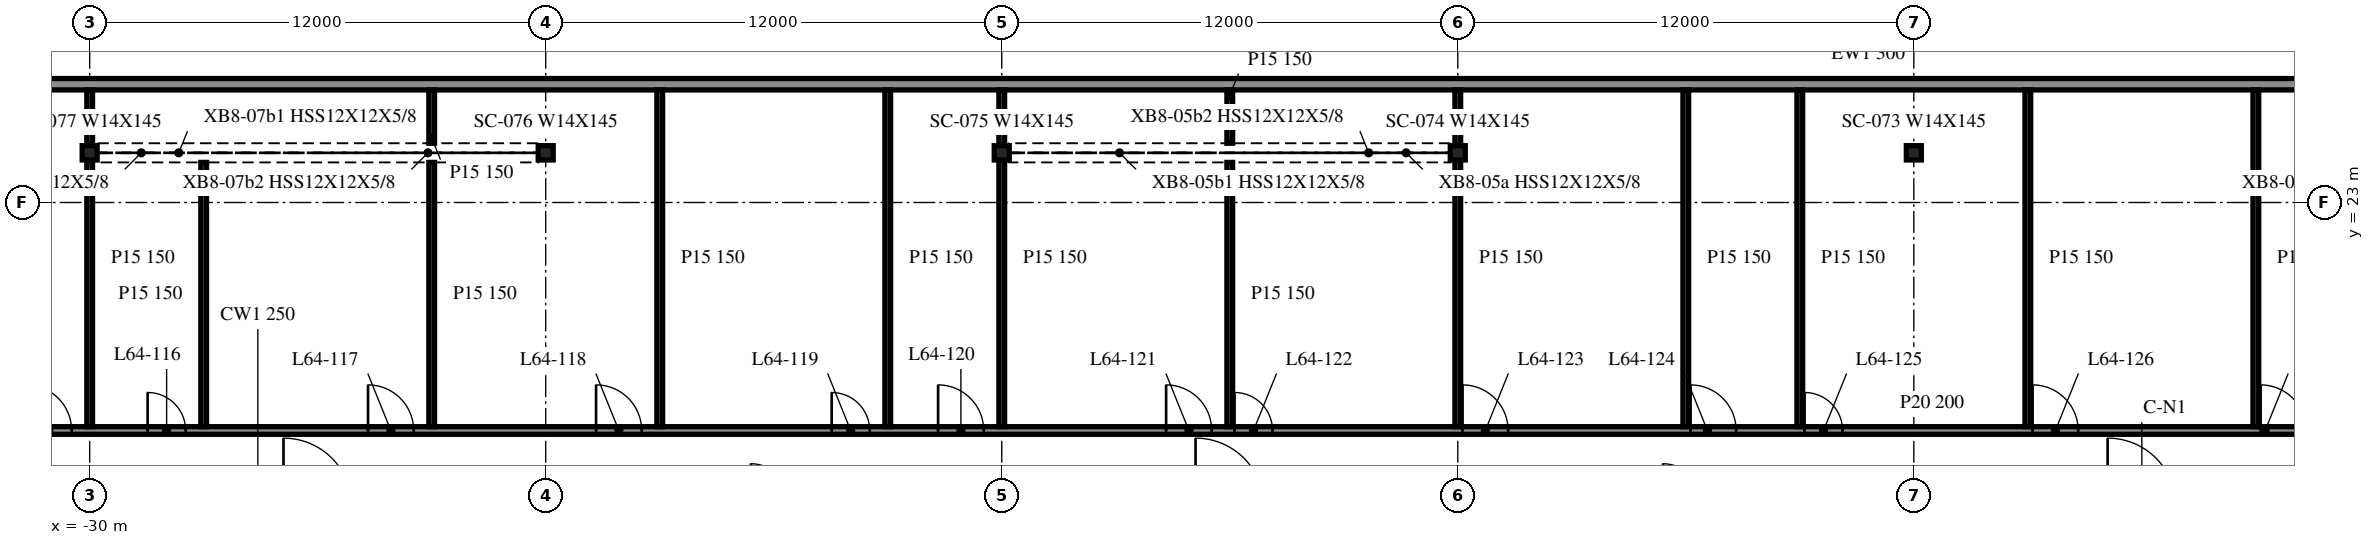
"""IFC4 building model, lengths in metres.
Left out: names, types, materials, properties, quantities, classifications, styles, units other than length and angle.
Written with IfcOpenShell. Run it as: python <this file> out.ifc"""

import sys

from ifc_helpers import new_model, si_unit, direction, frame, frame_2d, origin, origin_2d, place, context, subcontext, project, spatial, rectangle, i_section, extrude, element, fill, save


model = new_model("IFC4")
c1 = context("Model", 3, precision=1e-05, world=origin(), true_north=direction((0.0, 1.0)))
c2 = subcontext(c1, "Body", "Model", "MODEL_VIEW")
j1 = project(units=[si_unit("LENGTHUNIT", "METRE"), si_unit("PLANEANGLEUNIT", "RADIAN")], contexts=[c1])
p1 = place(None, origin())
s1 = spatial("IfcSite", under=j1, at=p1, CompositionType="ELEMENT")
p2 = place(p1, origin())
s2 = spatial("IfcBuilding", under=s1, at=p2, CompositionType="ELEMENT")
p3 = place(p2, frame((0.0, 0.0, 263.3)))
s3 = spatial("IfcBuildingStorey", under=s2, at=p3, CompositionType="ELEMENT", Elevation=263.3)
for number, where, z_axis, x_axis in (
    (1, (18.0, 24.307, -0.34), (0.0, 0.0, 1.0), (1.0, 0.0, 0.0)),
    (2, (6.0, 24.307, -0.34), (0.0, 0.0, 1.0), (1.0, 0.0, 0.0)),
    (3, (-6.0, 24.307, -0.34), (0.0, 0.0, 1.0), (1.0, 0.0, 0.0)),
    (4, (-18.0, 24.307, -0.34), (0.0, 0.0, 1.0), (1.0, 0.0, 0.0)),
    (5, (-30.0, 24.307, -0.34), (0.0, 0.0, 1.0), (1.0, 0.0, 0.0)),
):
    element("IfcColumn", number, at=place(p3, frame(where, z_axis=z_axis, x_axis=x_axis)), inside=s3, PredefinedType="COLUMN", context=c2, shape_type="SweptSolid", body=[
        extrude(i_section(OverallWidth=0.394, OverallDepth=0.376, WebThickness=0.017, FlangeThickness=0.028, at=origin_2d()), origin(), (0.0, 0.0, 1.0), 3.8),
    ])
p4 = place(p3, frame((42.0, 26.112, 0.0), z_axis=(0.0, 0.0, 1.0), x_axis=(-1.0, 0.0, 0.0)))
e6 = element("IfcWall", 6, at=p4, inside=s3, PredefinedType="NOTDEFINED", context=c2, shape_type="SweptSolid", body=[
    extrude(rectangle(XDim=84.0, YDim=0.3, at=frame_2d((42.0, 0.0))), origin(), (0.0, 0.0, 1.0), 2.853),
])
p5 = place(p3, frame((-47.975, 17.0, 0.0), z_axis=(0.0, 0.0, 1.0), x_axis=(1.0, 0.0, 0.0)))
e7 = element("IfcWall", 7, at=p5, inside=s3, PredefinedType="PARTITIONING", context=c2, shape_type="SweptSolid", body=[
    extrude(rectangle(XDim=95.95, YDim=0.2, at=frame_2d((47.975, 0.0))), origin(), (0.0, 0.0, 1.0), 3.46),
])
p6 = place(p5, frame((4.5, 0.0, 0.0)))
e8 = element("IfcOpeningElement", 8, at=p6, cuts=e7, PredefinedType="OPENING", context=c2, shape_type="SweptSolid", body=[
    extrude(rectangle(XDim=1.0, YDim=2.1, at=frame_2d((0.5, 1.05))), frame((0.0, 0.11, 0.0), z_axis=(0.0, -1.0, 0.0), x_axis=(1.0, 0.0, 0.0)), (0.0, 0.0, 1.0), 0.22),
])
p7 = place(p5, frame((10.3, 0.0, 0.0)))
e9 = element("IfcOpeningElement", 9, at=p7, cuts=e7, PredefinedType="OPENING", context=c2, shape_type="SweptSolid", body=[
    extrude(rectangle(XDim=1.2, YDim=2.1, at=frame_2d((0.6, 1.05))), frame((0.0, 0.11, 0.0), z_axis=(0.0, -1.0, 0.0), x_axis=(1.0, 0.0, 0.0)), (0.0, 0.0, 1.0), 0.22),
])
p8 = place(p5, frame((16.3, 0.0, 0.0)))
e10 = element("IfcOpeningElement", 10, at=p8, cuts=e7, PredefinedType="OPENING", context=c2, shape_type="SweptSolid", body=[
    extrude(rectangle(XDim=1.2, YDim=2.1, at=frame_2d((0.6, 1.05))), frame((0.0, 0.11, 0.0), z_axis=(0.0, -1.0, 0.0), x_axis=(1.0, 0.0, 0.0)), (0.0, 0.0, 1.0), 0.22),
])
p9 = place(p5, frame((19.5, 0.0, 0.0)))
e11 = element("IfcOpeningElement", 11, at=p9, cuts=e7, PredefinedType="OPENING", context=c2, shape_type="SweptSolid", body=[
    extrude(rectangle(XDim=1.0, YDim=2.1, at=frame_2d((0.5, 1.05))), frame((0.0, 0.11, 0.0), z_axis=(0.0, -1.0, 0.0), x_axis=(1.0, 0.0, 0.0)), (0.0, 0.0, 1.0), 0.22),
])
p10 = place(p5, frame((25.3, 0.0, 0.0)))
e12 = element("IfcOpeningElement", 12, at=p10, cuts=e7, PredefinedType="OPENING", context=c2, shape_type="SweptSolid", body=[
    extrude(rectangle(XDim=1.2, YDim=2.1, at=frame_2d((0.6, 1.05))), frame((0.0, 0.11, 0.0), z_axis=(0.0, -1.0, 0.0), x_axis=(1.0, 0.0, 0.0)), (0.0, 0.0, 1.0), 0.22),
])
p11 = place(p5, frame((31.3, 0.0, 0.0)))
e13 = element("IfcOpeningElement", 13, at=p11, cuts=e7, PredefinedType="OPENING", context=c2, shape_type="SweptSolid", body=[
    extrude(rectangle(XDim=1.2, YDim=2.1, at=frame_2d((0.6, 1.05))), frame((0.0, 0.11, 0.0), z_axis=(0.0, -1.0, 0.0), x_axis=(1.0, 0.0, 0.0)), (0.0, 0.0, 1.0), 0.22),
])
p12 = place(p5, frame((37.5, 0.0, 0.0)))
e14 = element("IfcOpeningElement", 14, at=p12, cuts=e7, PredefinedType="OPENING", context=c2, shape_type="SweptSolid", body=[
    extrude(rectangle(XDim=1.0, YDim=2.1, at=frame_2d((0.5, 1.05))), frame((0.0, 0.11, 0.0), z_axis=(0.0, -1.0, 0.0), x_axis=(1.0, 0.0, 0.0)), (0.0, 0.0, 1.0), 0.22),
])
p13 = place(p5, frame((40.3, 0.0, 0.0)))
e15 = element("IfcOpeningElement", 15, at=p13, cuts=e7, PredefinedType="OPENING", context=c2, shape_type="SweptSolid", body=[
    extrude(rectangle(XDim=1.2, YDim=2.1, at=frame_2d((0.6, 1.05))), frame((0.0, 0.11, 0.0), z_axis=(0.0, -1.0, 0.0), x_axis=(1.0, 0.0, 0.0)), (0.0, 0.0, 1.0), 0.22),
])
p14 = place(p5, frame((46.3, 0.0, 0.0)))
e16 = element("IfcOpeningElement", 16, at=p14, cuts=e7, PredefinedType="OPENING", context=c2, shape_type="SweptSolid", body=[
    extrude(rectangle(XDim=1.2, YDim=2.1, at=frame_2d((0.6, 1.05))), frame((0.0, 0.11, 0.0), z_axis=(0.0, -1.0, 0.0), x_axis=(1.0, 0.0, 0.0)), (0.0, 0.0, 1.0), 0.22),
])
p15 = place(p5, frame((48.1, 0.0, 0.0)))
e17 = element("IfcOpeningElement", 17, at=p15, cuts=e7, PredefinedType="OPENING", context=c2, shape_type="SweptSolid", body=[
    extrude(rectangle(XDim=1.0, YDim=2.1, at=frame_2d((0.5, 1.05))), frame((0.0, 0.11, 0.0), z_axis=(0.0, -1.0, 0.0), x_axis=(1.0, 0.0, 0.0)), (0.0, 0.0, 1.0), 0.22),
])
p16 = place(p5, frame((54.1, 0.0, 0.0)))
e18 = element("IfcOpeningElement", 18, at=p16, cuts=e7, PredefinedType="OPENING", context=c2, shape_type="SweptSolid", body=[
    extrude(rectangle(XDim=1.2, YDim=2.1, at=frame_2d((0.6, 1.05))), frame((0.0, 0.11, 0.0), z_axis=(0.0, -1.0, 0.0), x_axis=(1.0, 0.0, 0.0)), (0.0, 0.0, 1.0), 0.22),
])
p17 = place(p5, frame((60.1, 0.0, 0.0)))
e19 = element("IfcOpeningElement", 19, at=p17, cuts=e7, PredefinedType="OPENING", context=c2, shape_type="SweptSolid", body=[
    extrude(rectangle(XDim=1.2, YDim=2.1, at=frame_2d((0.6, 1.05))), frame((0.0, 0.11, 0.0), z_axis=(0.0, -1.0, 0.0), x_axis=(1.0, 0.0, 0.0)), (0.0, 0.0, 1.0), 0.22),
])
p18 = place(p5, frame((63.1, 0.0, 0.0)))
e20 = element("IfcOpeningElement", 20, at=p18, cuts=e7, PredefinedType="OPENING", context=c2, shape_type="SweptSolid", body=[
    extrude(rectangle(XDim=1.0, YDim=2.1, at=frame_2d((0.5, 1.05))), frame((0.0, 0.11, 0.0), z_axis=(0.0, -1.0, 0.0), x_axis=(1.0, 0.0, 0.0)), (0.0, 0.0, 1.0), 0.22),
])
p19 = place(p5, frame((69.1, 0.0, 0.0)))
e21 = element("IfcOpeningElement", 21, at=p19, cuts=e7, PredefinedType="OPENING", context=c2, shape_type="SweptSolid", body=[
    extrude(rectangle(XDim=1.2, YDim=2.1, at=frame_2d((0.6, 1.05))), frame((0.0, 0.11, 0.0), z_axis=(0.0, -1.0, 0.0), x_axis=(1.0, 0.0, 0.0)), (0.0, 0.0, 1.0), 0.22),
])
p20 = place(p5, frame((75.1, 0.0, 0.0)))
e22 = element("IfcOpeningElement", 22, at=p20, cuts=e7, PredefinedType="OPENING", context=c2, shape_type="SweptSolid", body=[
    extrude(rectangle(XDim=1.2, YDim=2.1, at=frame_2d((0.6, 1.05))), frame((0.0, 0.11, 0.0), z_axis=(0.0, -1.0, 0.0), x_axis=(1.0, 0.0, 0.0)), (0.0, 0.0, 1.0), 0.22),
])
p21 = place(p5, frame((81.1, 0.0, 0.0)))
e23 = element("IfcOpeningElement", 23, at=p21, cuts=e7, PredefinedType="OPENING", context=c2, shape_type="SweptSolid", body=[
    extrude(rectangle(XDim=1.0, YDim=2.1, at=frame_2d((0.5, 1.05))), frame((0.0, 0.11, 0.0), z_axis=(0.0, -1.0, 0.0), x_axis=(1.0, 0.0, 0.0)), (0.0, 0.0, 1.0), 0.22),
])
p22 = place(p5, frame((84.1, 0.0, 0.0)))
e24 = element("IfcOpeningElement", 24, at=p22, cuts=e7, PredefinedType="OPENING", context=c2, shape_type="SweptSolid", body=[
    extrude(rectangle(XDim=1.2, YDim=2.1, at=frame_2d((0.6, 1.05))), frame((0.0, 0.11, 0.0), z_axis=(0.0, -1.0, 0.0), x_axis=(1.0, 0.0, 0.0)), (0.0, 0.0, 1.0), 0.22),
])
p23 = place(p5, frame((90.1, 0.0, 0.0)))
e25 = element("IfcOpeningElement", 25, at=p23, cuts=e7, PredefinedType="OPENING", context=c2, shape_type="SweptSolid", body=[
    extrude(rectangle(XDim=1.2, YDim=2.1, at=frame_2d((0.6, 1.05))), frame((0.0, 0.11, 0.0), z_axis=(0.0, -1.0, 0.0), x_axis=(1.0, 0.0, 0.0)), (0.0, 0.0, 1.0), 0.22),
])
p24 = place(p3, frame((-30.0, 17.1, 0.0), z_axis=(0.0, 0.0, 1.0), x_axis=(0.0, 1.0, 0.0)))
e26 = element("IfcWall", 26, at=p24, inside=s3, PredefinedType="PARTITIONING", context=c2, shape_type="SweptSolid", body=[
    extrude(rectangle(XDim=8.862, YDim=0.15, at=frame_2d((4.431, 0.0))), origin(), (0.0, 0.0, 1.0), 3.46),
])
for number, where, z_axis, x_axis in (
    (27, (-27.0, 17.1, 0.0), (0.0, 0.0, 1.0), (0.0, 1.0, 0.0)),
    (28, (-21.0, 17.1, 0.0), (0.0, 0.0, 1.0), (0.0, 1.0, 0.0)),
):
    element("IfcWall", number, at=place(p3, frame(where, z_axis=z_axis, x_axis=x_axis)), inside=s3, PredefinedType="PARTITIONING", context=c2, shape_type="SweptSolid", body=[
        extrude(rectangle(XDim=6.955, YDim=0.15, at=frame_2d((3.477, 0.0))), origin(), (0.0, 0.0, 1.0), 3.46),
    ])
p25 = place(p3, frame((-21.0, 24.559, 0.0), z_axis=(0.0, 0.0, 1.0), x_axis=(0.0, 1.0, 0.0)))
e29 = element("IfcWall", 29, at=p25, inside=s3, PredefinedType="PARTITIONING", context=c2, shape_type="SweptSolid", body=[
    extrude(rectangle(XDim=1.403, YDim=0.15, at=frame_2d((0.701, 0.0))), origin(), (0.0, 0.0, 1.0), 3.46),
])
for number, where, z_axis, x_axis in (
    (30, (-15.0, 17.1, 0.0), (0.0, 0.0, 1.0), (0.0, 1.0, 0.0)),
    (31, (-9.0, 17.1, 0.0), (0.0, 0.0, 1.0), (0.0, 1.0, 0.0)),
    (32, (-6.0, 17.1, 0.0), (0.0, 0.0, 1.0), (0.0, 1.0, 0.0)),
):
    element("IfcWall", number, at=place(p3, frame(where, z_axis=z_axis, x_axis=x_axis)), inside=s3, PredefinedType="PARTITIONING", context=c2, shape_type="SweptSolid", body=[
        extrude(rectangle(XDim=8.862, YDim=0.15, at=frame_2d((4.431, 0.0))), origin(), (0.0, 0.0, 1.0), 3.46),
    ])
p26 = place(p3, frame((0.0, 17.1, 0.0), z_axis=(0.0, 0.0, 1.0), x_axis=(0.0, 1.0, 0.0)))
e33 = element("IfcWall", 33, at=p26, inside=s3, PredefinedType="PARTITIONING", context=c2, shape_type="SweptSolid", body=[
    extrude(rectangle(XDim=6.955, YDim=0.15, at=frame_2d((3.477, 0.0))), origin(), (0.0, 0.0, 1.0), 3.46),
])
p27 = place(p3, frame((0.0, 24.559, 0.0), z_axis=(0.0, 0.0, 1.0), x_axis=(0.0, 1.0, 0.0)))
e34 = element("IfcWall", 34, at=p27, inside=s3, PredefinedType="PARTITIONING", context=c2, shape_type="SweptSolid", body=[
    extrude(rectangle(XDim=1.403, YDim=0.15, at=frame_2d((0.701, 0.0))), origin(), (0.0, 0.0, 1.0), 3.46),
])
for number, where, z_axis, x_axis in (
    (35, (6.0, 17.1, 0.0), (0.0, 0.0, 1.0), (0.0, 1.0, 0.0)),
    (36, (12.0, 17.1, 0.0), (0.0, 0.0, 1.0), (0.0, 1.0, 0.0)),
    (37, (15.0, 17.1, 0.0), (0.0, 0.0, 1.0), (0.0, 1.0, 0.0)),
    (38, (21.0, 17.1, 0.0), (0.0, 0.0, 1.0), (0.0, 1.0, 0.0)),
    (39, (27.0, 17.1, 0.0), (0.0, 0.0, 1.0), (0.0, 1.0, 0.0)),
):
    element("IfcWall", number, at=place(p3, frame(where, z_axis=z_axis, x_axis=x_axis)), inside=s3, PredefinedType="PARTITIONING", context=c2, shape_type="SweptSolid", body=[
        extrude(rectangle(XDim=8.862, YDim=0.15, at=frame_2d((4.431, 0.0))), origin(), (0.0, 0.0, 1.0), 3.46),
    ])
p28 = place(p8, origin())
e40 = element("IfcDoor", 40, at=p28, inside=s3, OperationType="SINGLE_SWING_LEFT", PredefinedType="DOOR", context=c2, shape_type="SweptSolid", body=[
    extrude(rectangle(XDim=1.2, YDim=2.1, at=frame_2d((0.6, 1.05))), frame((0.0, 0.025, 0.0), z_axis=(0.0, -1.0, 0.0), x_axis=(1.0, 0.0, 0.0)), (0.0, 0.0, 1.0), 0.05),
])
fill(e10, e40)
p29 = place(p9, origin())
e41 = element("IfcDoor", 41, at=p29, inside=s3, OperationType="SINGLE_SWING_LEFT", PredefinedType="DOOR", context=c2, shape_type="SweptSolid", body=[
    extrude(rectangle(XDim=1.0, YDim=2.1, at=frame_2d((0.5, 1.05))), frame((0.0, 0.025, 0.0), z_axis=(0.0, -1.0, 0.0), x_axis=(1.0, 0.0, 0.0)), (0.0, 0.0, 1.0), 0.05),
])
fill(e11, e41)
p30 = place(p10, origin())
e42 = element("IfcDoor", 42, at=p30, inside=s3, OperationType="SINGLE_SWING_LEFT", PredefinedType="DOOR", context=c2, shape_type="SweptSolid", body=[
    extrude(rectangle(XDim=1.2, YDim=2.1, at=frame_2d((0.6, 1.05))), frame((0.0, 0.025, 0.0), z_axis=(0.0, -1.0, 0.0), x_axis=(1.0, 0.0, 0.0)), (0.0, 0.0, 1.0), 0.05),
])
fill(e12, e42)
p31 = place(p11, origin())
e43 = element("IfcDoor", 43, at=p31, inside=s3, OperationType="SINGLE_SWING_LEFT", PredefinedType="DOOR", context=c2, shape_type="SweptSolid", body=[
    extrude(rectangle(XDim=1.2, YDim=2.1, at=frame_2d((0.6, 1.05))), frame((0.0, 0.025, 0.0), z_axis=(0.0, -1.0, 0.0), x_axis=(1.0, 0.0, 0.0)), (0.0, 0.0, 1.0), 0.05),
])
fill(e13, e43)
p32 = place(p12, origin())
e44 = element("IfcDoor", 44, at=p32, inside=s3, OperationType="SINGLE_SWING_LEFT", PredefinedType="DOOR", context=c2, shape_type="SweptSolid", body=[
    extrude(rectangle(XDim=1.0, YDim=2.1, at=frame_2d((0.5, 1.05))), frame((0.0, 0.025, 0.0), z_axis=(0.0, -1.0, 0.0), x_axis=(1.0, 0.0, 0.0)), (0.0, 0.0, 1.0), 0.05),
])
fill(e14, e44)
p33 = place(p13, origin())
e45 = element("IfcDoor", 45, at=p33, inside=s3, OperationType="SINGLE_SWING_LEFT", PredefinedType="DOOR", context=c2, shape_type="SweptSolid", body=[
    extrude(rectangle(XDim=1.2, YDim=2.1, at=frame_2d((0.6, 1.05))), frame((0.0, 0.025, 0.0), z_axis=(0.0, -1.0, 0.0), x_axis=(1.0, 0.0, 0.0)), (0.0, 0.0, 1.0), 0.05),
])
fill(e15, e45)
p34 = place(p14, origin())
e46 = element("IfcDoor", 46, at=p34, inside=s3, OperationType="SINGLE_SWING_LEFT", PredefinedType="DOOR", context=c2, shape_type="SweptSolid", body=[
    extrude(rectangle(XDim=1.2, YDim=2.1, at=frame_2d((0.6, 1.05))), frame((0.0, 0.025, 0.0), z_axis=(0.0, -1.0, 0.0), x_axis=(1.0, 0.0, 0.0)), (0.0, 0.0, 1.0), 0.05),
])
fill(e16, e46)
p35 = place(p15, origin())
e47 = element("IfcDoor", 47, at=p35, inside=s3, OperationType="SINGLE_SWING_RIGHT", PredefinedType="DOOR", context=c2, shape_type="SweptSolid", body=[
    extrude(rectangle(XDim=1.0, YDim=2.1, at=frame_2d((0.5, 1.05))), frame((0.0, 0.025, 0.0), z_axis=(0.0, -1.0, 0.0), x_axis=(1.0, 0.0, 0.0)), (0.0, 0.0, 1.0), 0.05),
])
fill(e17, e47)
p36 = place(p16, origin())
e48 = element("IfcDoor", 48, at=p36, inside=s3, OperationType="SINGLE_SWING_RIGHT", PredefinedType="DOOR", context=c2, shape_type="SweptSolid", body=[
    extrude(rectangle(XDim=1.2, YDim=2.1, at=frame_2d((0.6, 1.05))), frame((0.0, 0.025, 0.0), z_axis=(0.0, -1.0, 0.0), x_axis=(1.0, 0.0, 0.0)), (0.0, 0.0, 1.0), 0.05),
])
fill(e18, e48)
p37 = place(p17, origin())
e49 = element("IfcDoor", 49, at=p37, inside=s3, OperationType="SINGLE_SWING_RIGHT", PredefinedType="DOOR", context=c2, shape_type="SweptSolid", body=[
    extrude(rectangle(XDim=1.2, YDim=2.1, at=frame_2d((0.6, 1.05))), frame((0.0, 0.025, 0.0), z_axis=(0.0, -1.0, 0.0), x_axis=(1.0, 0.0, 0.0)), (0.0, 0.0, 1.0), 0.05),
])
fill(e19, e49)
p38 = place(p18, origin())
e50 = element("IfcDoor", 50, at=p38, inside=s3, OperationType="SINGLE_SWING_RIGHT", PredefinedType="DOOR", context=c2, shape_type="SweptSolid", body=[
    extrude(rectangle(XDim=1.0, YDim=2.1, at=frame_2d((0.5, 1.05))), frame((0.0, 0.025, 0.0), z_axis=(0.0, -1.0, 0.0), x_axis=(1.0, 0.0, 0.0)), (0.0, 0.0, 1.0), 0.05),
])
fill(e20, e50)
p39 = place(p19, origin())
e51 = element("IfcDoor", 51, at=p39, inside=s3, OperationType="SINGLE_SWING_RIGHT", PredefinedType="DOOR", context=c2, shape_type="SweptSolid", body=[
    extrude(rectangle(XDim=1.2, YDim=2.1, at=frame_2d((0.6, 1.05))), frame((0.0, 0.025, 0.0), z_axis=(0.0, -1.0, 0.0), x_axis=(1.0, 0.0, 0.0)), (0.0, 0.0, 1.0), 0.05),
])
fill(e21, e51)
p40 = place(p20, origin())
e52 = element("IfcDoor", 52, at=p40, inside=s3, OperationType="SINGLE_SWING_RIGHT", PredefinedType="DOOR", context=c2, shape_type="SweptSolid", body=[
    extrude(rectangle(XDim=1.2, YDim=2.1, at=frame_2d((0.6, 1.05))), frame((0.0, 0.025, 0.0), z_axis=(0.0, -1.0, 0.0), x_axis=(1.0, 0.0, 0.0)), (0.0, 0.0, 1.0), 0.05),
])
fill(e22, e52)
save(model, sys.argv[1])
